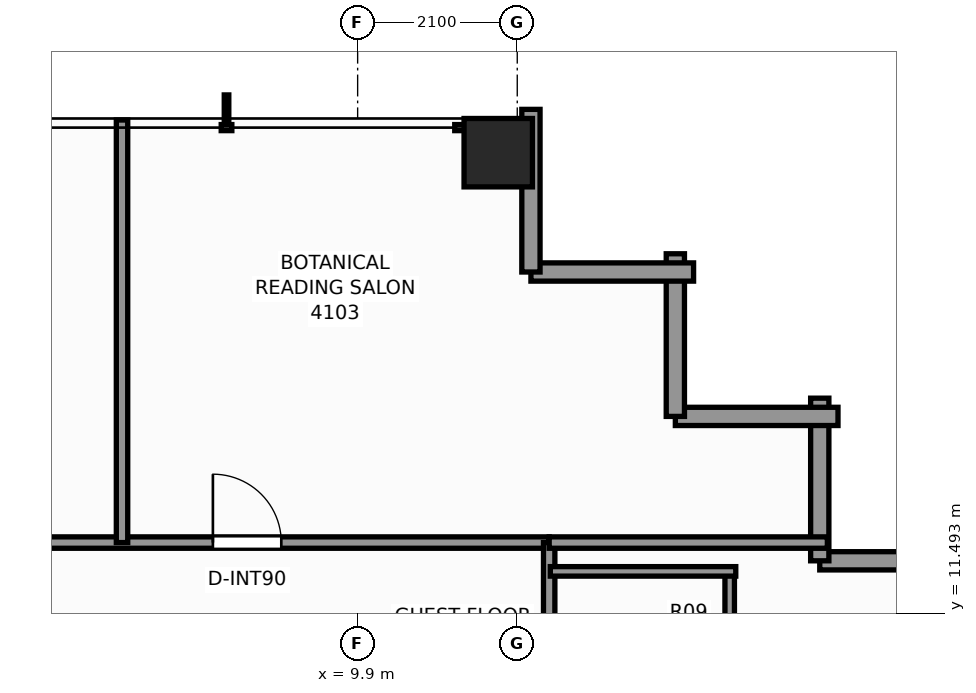
"""IFC4 building model, lengths in metres.
Left out: names, types, materials, properties, quantities, classifications, styles, units other than length and angle.
Written with IfcOpenShell. Run it as: python <this file> out.ifc"""

import sys

from ifc_helpers import new_model, si_unit, direction, frame, frame_2d, origin, origin_2d, place, context, subcontext, project, spatial, rectangle, extrude, element, fill, save


model = new_model("IFC4")
c1 = context("Model", 3, precision=1e-05, world=origin(), true_north=direction((0.0, 1.0)))
c2 = subcontext(c1, "Body", "Model", "MODEL_VIEW")
j1 = project(units=[si_unit("LENGTHUNIT", "METRE"), si_unit("PLANEANGLEUNIT", "RADIAN")], contexts=[c1])
p1 = place(None, origin())
s1 = spatial("IfcSite", under=j1, at=p1, CompositionType="ELEMENT")
p2 = place(p1, origin())
s2 = spatial("IfcBuilding", under=s1, at=p2, CompositionType="ELEMENT")
p3 = place(p2, frame((0.0, 0.0, 141.5)))
s3 = spatial("IfcBuildingStorey", under=s2, at=p3, CompositionType="ELEMENT", Elevation=141.5)
p4 = place(p3, frame((11.75, 17.55, 0.0), z_axis=(0.0, 0.0, 1.0), x_axis=(1.0, 0.0, 0.0)))
e1 = element("IfcColumn", 1, at=p4, inside=s3, PredefinedType="COLUMN", context=c2, shape_type="SweptSolid", body=[
    extrude(rectangle(XDim=0.9, YDim=0.9, at=origin_2d()), origin(), (0.0, 0.0, 1.0), 3.3),
])
for number, where, z_axis, x_axis in (
    (2, (15.98, 12.18, 0.0), (0.0, 0.0, 1.0), (1.0, 0.0, 0.0)),
    (3, (15.98, 14.32, 0.0), (0.0, 0.0, 1.0), (0.0, -1.0, 0.0)),
):
    element("IfcWall", number, at=place(p3, frame(where, z_axis=z_axis, x_axis=x_axis)), inside=s3, PredefinedType="STANDARD", context=c2, shape_type="SweptSolid", body=[
        extrude(rectangle(XDim=2.14, YDim=0.24, at=frame_2d((1.07, 0.0))), origin(), (0.0, 0.0, 1.0), 2.479),
    ])
for number, where, z_axis, x_axis in (
    (4, (14.08, 14.08, 0.0), (0.0, 0.0, 1.0), (1.0, 0.0, 0.0)),
    (5, (14.08, 16.22, 0.0), (0.0, 0.0, 1.0), (0.0, -1.0, 0.0)),
):
    element("IfcWall", number, at=place(p3, frame(where, z_axis=z_axis, x_axis=x_axis)), inside=s3, PredefinedType="STANDARD", context=c2, shape_type="SweptSolid", body=[
        extrude(rectangle(XDim=2.14, YDim=0.24, at=frame_2d((1.07, 0.0))), origin(), (0.0, 0.0, 1.0), 2.479),
    ])
for number, where, z_axis, x_axis in (
    (6, (12.18, 15.98, 0.0), (0.0, 0.0, 1.0), (1.0, 0.0, 0.0)),
    (7, (12.18, 18.12, 0.0), (0.0, 0.0, 1.0), (0.0, -1.0, 0.0)),
):
    element("IfcWall", number, at=place(p3, frame(where, z_axis=z_axis, x_axis=x_axis)), inside=s3, PredefinedType="STANDARD", context=c2, shape_type="SweptSolid", body=[
        extrude(rectangle(XDim=2.14, YDim=0.24, at=frame_2d((1.07, 0.0))), origin(), (0.0, 0.0, 1.0), 2.479),
    ])
p5 = place(p3, frame((-12.26, 12.42, 0.0), z_axis=(0.0, 0.0, 1.0), x_axis=(1.0, 0.0, 0.0)))
e8 = element("IfcWall", 8, at=p5, inside=s3, PredefinedType="PARTITIONING", context=c2, shape_type="SweptSolid", body=[
    extrude(rectangle(XDim=24.68, YDim=0.15, at=frame_2d((12.34, 0.0))), origin(), (0.0, 0.0, 1.0), 2.312),
])
p6 = place(p5, frame((2.93, 0.0, 0.0)))
e9 = element("IfcOpeningElement", 9, at=p6, cuts=e8, PredefinedType="OPENING", context=c2, shape_type="SweptSolid", body=[
    extrude(rectangle(XDim=0.9, YDim=2.06, at=frame_2d((0.45, 1.03))), frame((0.0, 0.085, 0.0), z_axis=(0.0, -1.0, 0.0), x_axis=(1.0, 0.0, 0.0)), (0.0, 0.0, 1.0), 0.17),
])
p7 = place(p5, frame((5.09, 0.0, 0.0)))
e10 = element("IfcOpeningElement", 10, at=p7, cuts=e8, PredefinedType="OPENING", context=c2, shape_type="SweptSolid", body=[
    extrude(rectangle(XDim=0.9, YDim=2.06, at=frame_2d((0.45, 1.03))), frame((0.0, 0.085, 0.0), z_axis=(0.0, -1.0, 0.0), x_axis=(1.0, 0.0, 0.0)), (0.0, 0.0, 1.0), 0.17),
])
p8 = place(p5, frame((9.092, 0.0, 0.0)))
e11 = element("IfcOpeningElement", 11, at=p8, cuts=e8, PredefinedType="OPENING", context=c2, shape_type="SweptSolid", body=[
    extrude(rectangle(XDim=0.95, YDim=2.06, at=frame_2d((0.475, 1.03))), frame((0.0, 0.085, 0.0), z_axis=(0.0, -1.0, 0.0), x_axis=(1.0, 0.0, 0.0)), (0.0, 0.0, 1.0), 0.17),
])
p9 = place(p5, frame((13.84, 0.0, 0.0)))
e12 = element("IfcOpeningElement", 12, at=p9, cuts=e8, PredefinedType="OPENING", context=c2, shape_type="SweptSolid", body=[
    extrude(rectangle(XDim=0.9, YDim=2.06, at=frame_2d((0.45, 1.03))), frame((0.0, 0.085, 0.0), z_axis=(0.0, -1.0, 0.0), x_axis=(1.0, 0.0, 0.0)), (0.0, 0.0, 1.0), 0.17),
])
p10 = place(p5, frame((20.256, 0.0, 0.0)))
e13 = element("IfcOpeningElement", 13, at=p10, cuts=e8, PredefinedType="OPENING", context=c2, shape_type="SweptSolid", body=[
    extrude(rectangle(XDim=0.9, YDim=2.06, at=frame_2d((0.45, 1.03))), frame((0.0, 0.085, 0.0), z_axis=(0.0, -1.0, 0.0), x_axis=(1.0, 0.0, 0.0)), (0.0, 0.0, 1.0), 0.17),
])
p11 = place(p3, frame((12.42, -12.42, 0.0), z_axis=(0.0, 0.0, 1.0), x_axis=(0.0, 1.0, 0.0)))
e14 = element("IfcWall", 14, at=p11, inside=s3, PredefinedType="PARTITIONING", context=c2, shape_type="SweptSolid", body=[
    extrude(rectangle(XDim=24.84, YDim=0.15, at=frame_2d((12.42, 0.0))), origin(), (0.0, 0.0, 1.0), 2.312),
])
p12 = place(p11, frame((3.323, 0.0, 0.0)))
e15 = element("IfcOpeningElement", 15, at=p12, cuts=e14, PredefinedType="OPENING", context=c2, shape_type="SweptSolid", body=[
    extrude(rectangle(XDim=0.95, YDim=2.06, at=frame_2d((0.475, 1.03))), frame((0.0, 0.085, 0.0), z_axis=(0.0, -1.0, 0.0), x_axis=(1.0, 0.0, 0.0)), (0.0, 0.0, 1.0), 0.17),
])
p13 = place(p11, frame((5.593, 0.0, 0.0)))
e16 = element("IfcOpeningElement", 16, at=p13, cuts=e14, PredefinedType="OPENING", context=c2, shape_type="SweptSolid", body=[
    extrude(rectangle(XDim=0.95, YDim=2.06, at=frame_2d((0.475, 1.03))), frame((0.0, 0.085, 0.0), z_axis=(0.0, -1.0, 0.0), x_axis=(1.0, 0.0, 0.0)), (0.0, 0.0, 1.0), 0.17),
])
p14 = place(p11, frame((15.073, 0.0, 0.0)))
e17 = element("IfcOpeningElement", 17, at=p14, cuts=e14, PredefinedType="OPENING", context=c2, shape_type="SweptSolid", body=[
    extrude(rectangle(XDim=0.95, YDim=2.06, at=frame_2d((0.475, 1.03))), frame((0.0, 0.085, 0.0), z_axis=(0.0, -1.0, 0.0), x_axis=(1.0, 0.0, 0.0)), (0.0, 0.0, 1.0), 0.17),
])
p15 = place(p11, frame((20.05, 0.0, 0.0)))
e18 = element("IfcOpeningElement", 18, at=p15, cuts=e14, PredefinedType="OPENING", context=c2, shape_type="SweptSolid", body=[
    extrude(rectangle(XDim=0.95, YDim=2.06, at=frame_2d((0.475, 1.03))), frame((0.0, 0.085, 0.0), z_axis=(0.0, -1.0, 0.0), x_axis=(1.0, 0.0, 0.0)), (0.0, 0.0, 1.0), 0.17),
])
p16 = place(p3, frame((12.42, 12.42, 0.0), z_axis=(0.0, 0.0, 1.0), x_axis=(1.0, 0.0, 0.0)))
e19 = element("IfcWall", 19, at=p16, inside=s3, PredefinedType="PARTITIONING", context=c2, shape_type="SweptSolid", body=[
    extrude(rectangle(XDim=3.66, YDim=0.15, at=frame_2d((1.83, 0.0))), origin(), (0.0, 0.0, 1.0), 3.1),
])
p17 = place(p3, frame((6.8, 12.42, 0.0), z_axis=(0.0, 0.0, 1.0), x_axis=(0.0, 1.0, 0.0)))
e20 = element("IfcWall", 20, at=p17, inside=s3, PredefinedType="PARTITIONING", context=c2, shape_type="SweptSolid", body=[
    extrude(rectangle(XDim=5.56, YDim=0.15, at=frame_2d((2.78, 0.0))), origin(), (0.0, 0.0, 1.0), 2.469),
])
p18 = place(p3, frame((14.795, 9.831, 0.0), z_axis=(0.0, 0.0, 1.0), x_axis=(0.0, 1.0, 0.0)))
e21 = element("IfcWall", 21, at=p18, inside=s3, PredefinedType="PARTITIONING", context=c2, shape_type="SweptSolid", body=[
    extrude(rectangle(XDim=2.27, YDim=0.125, at=frame_2d((1.135, 0.0))), origin(), (0.0, 0.0, 1.0), 2.312),
])
p19 = place(p3, frame((12.435, 12.041, 0.0), z_axis=(0.0, 0.0, 1.0), x_axis=(1.0, 0.0, 0.0)))
e22 = element("IfcWall", 22, at=p19, inside=s3, PredefinedType="PARTITIONING", context=c2, shape_type="SweptSolid", body=[
    extrude(rectangle(XDim=2.44, YDim=0.125, at=frame_2d((1.22, 0.0))), origin(), (0.0, 0.0, 1.0), 3.1),
])
p20 = place(p10, origin())
e23 = element("IfcDoor", 23, at=p20, inside=s3, OperationType="SINGLE_SWING_LEFT", PredefinedType="DOOR", context=c2, shape_type="SweptSolid", body=[
    extrude(rectangle(XDim=0.9, YDim=2.06, at=frame_2d((0.45, 1.03))), frame((0.0, 0.025, 0.0), z_axis=(0.0, -1.0, 0.0), x_axis=(1.0, 0.0, 0.0)), (0.0, 0.0, 1.0), 0.05),
])
fill(e13, e23)
save(model, sys.argv[1])
